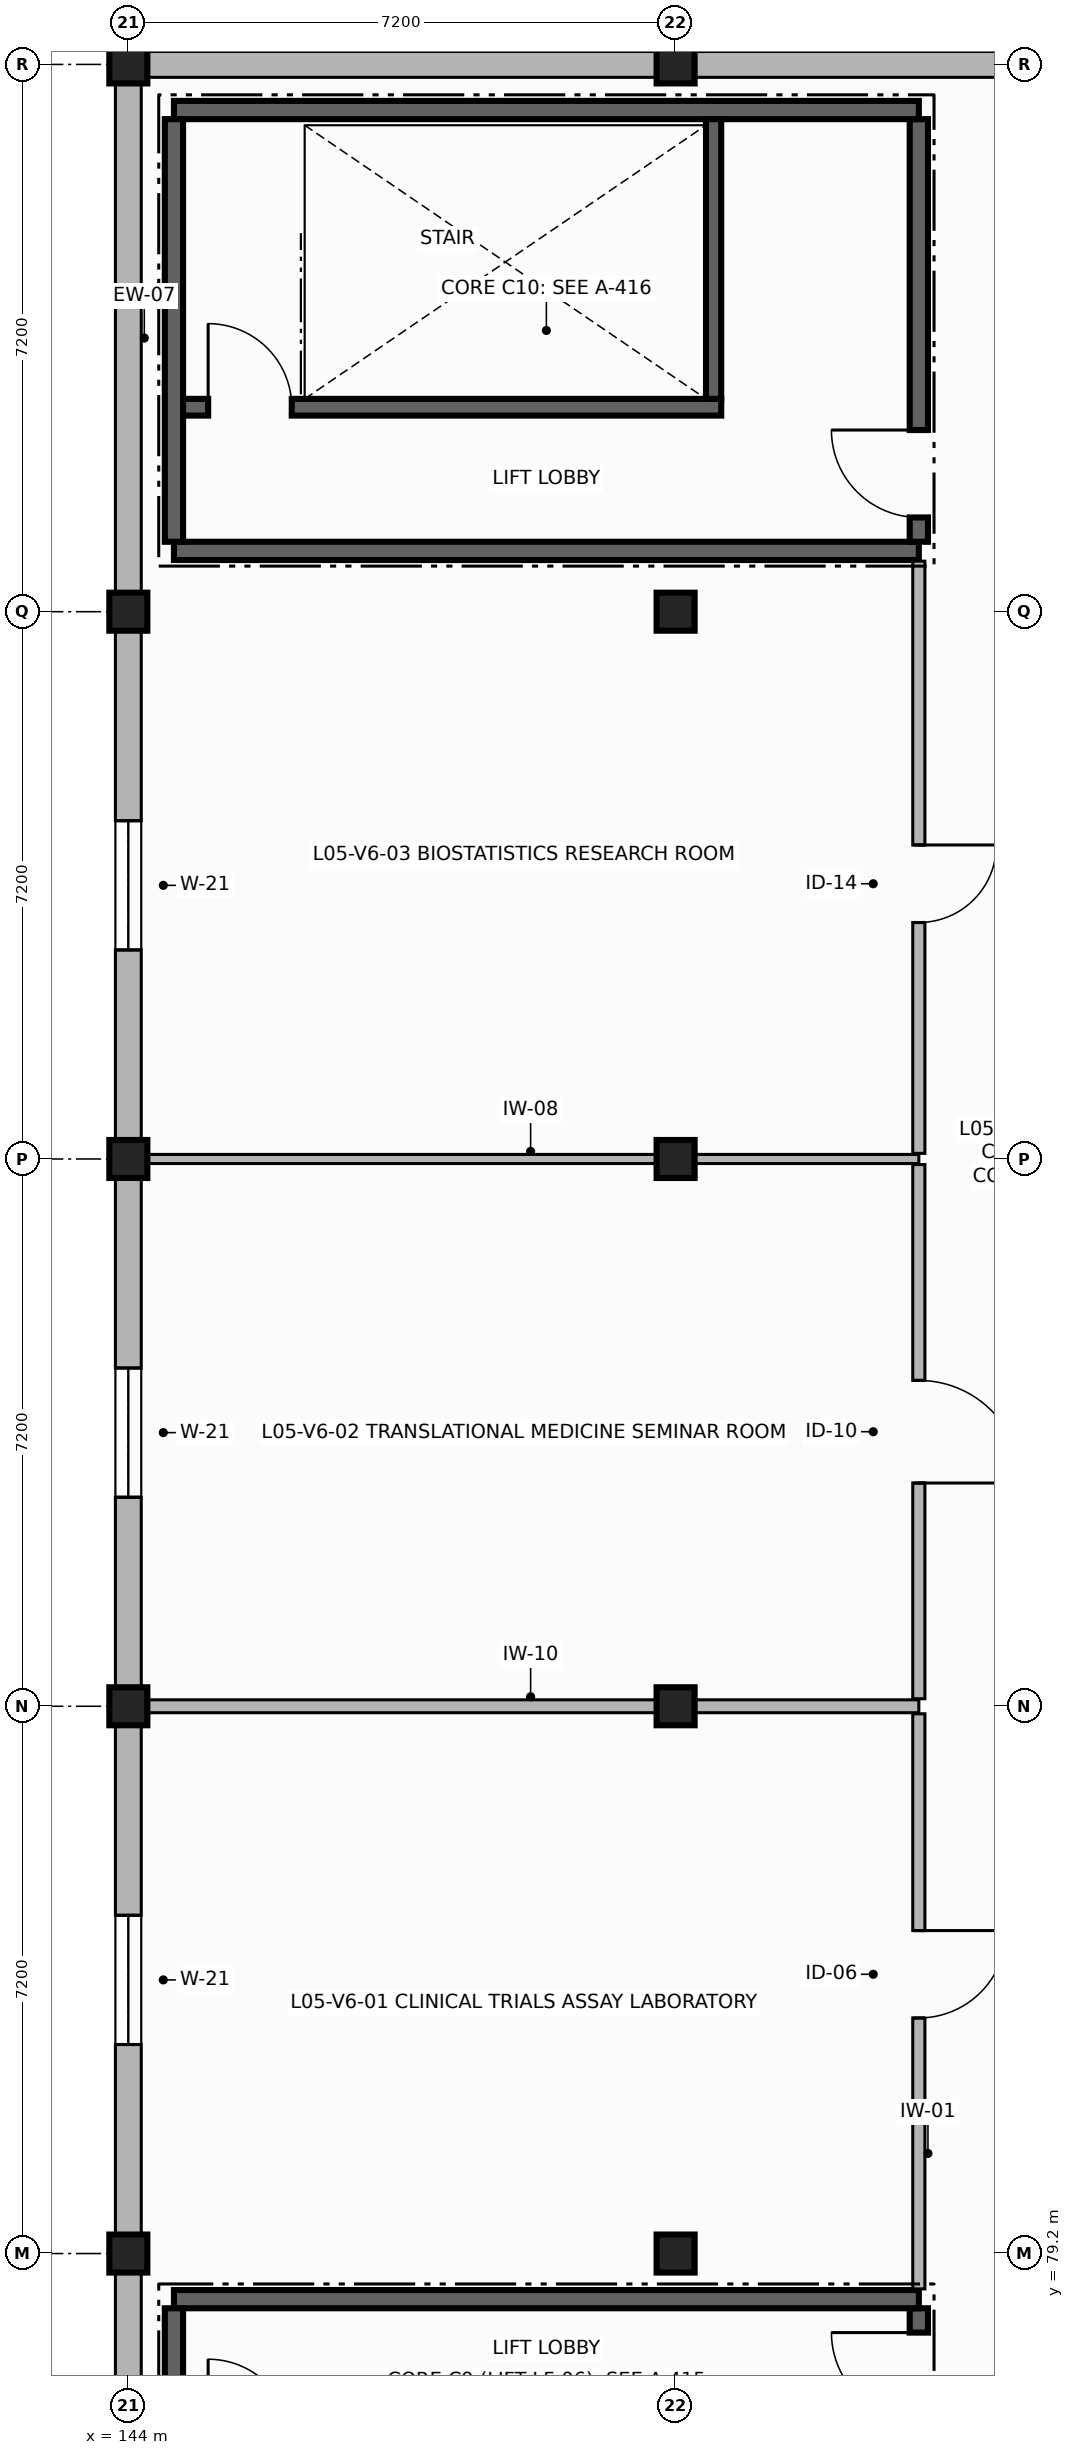
"""IFC4 building model, lengths in metres.
Left out: names, types, materials, properties, quantities, classifications, styles, units other than length and angle.
Written with IfcOpenShell. Run it as: python <this file> out.ifc"""

import sys

from ifc_helpers import new_model, si_unit, direction, frame, frame_2d, origin, origin_2d, place, context, subcontext, project, spatial, rectangle, extrude, element, fill, save


model = new_model("IFC4")
c1 = context("Model", 3, precision=1e-05, world=origin(), true_north=direction((0.0, 1.0)))
c2 = subcontext(c1, "Body", "Model", "MODEL_VIEW")
j1 = project(units=[si_unit("LENGTHUNIT", "METRE"), si_unit("PLANEANGLEUNIT", "RADIAN")], contexts=[c1])
p1 = place(None, origin())
s1 = spatial("IfcSite", under=j1, at=p1, CompositionType="ELEMENT")
p2 = place(p1, origin())
s2 = spatial("IfcBuilding", under=s1, at=p2, CompositionType="ELEMENT")
p3 = place(p2, frame((0.0, 0.0, 19.7)))
s3 = spatial("IfcBuildingStorey", under=s2, at=p3, CompositionType="ELEMENT", Elevation=19.7)
for number, where, z_axis, x_axis in (
    (1, (144.0, 79.2, 0.0), (0.0, 0.0, 1.0), (1.0, 0.0, 0.0)),
    (2, (144.0, 86.4, 0.0), (0.0, 0.0, 1.0), (1.0, 0.0, 0.0)),
    (3, (144.0, 93.6, 0.0), (0.0, 0.0, 1.0), (1.0, 0.0, 0.0)),
    (4, (144.0, 100.8, 0.0), (0.0, 0.0, 1.0), (1.0, 0.0, 0.0)),
    (5, (144.0, 108.0, 0.0), (0.0, 0.0, 1.0), (1.0, 0.0, 0.0)),
    (6, (151.2, 79.2, 0.0), (0.0, 0.0, 1.0), (1.0, 0.0, 0.0)),
    (7, (151.2, 86.4, 0.0), (0.0, 0.0, 1.0), (1.0, 0.0, 0.0)),
    (8, (151.2, 93.6, 0.0), (0.0, 0.0, 1.0), (1.0, 0.0, 0.0)),
    (9, (151.2, 100.8, 0.0), (0.0, 0.0, 1.0), (1.0, 0.0, 0.0)),
    (10, (151.2, 108.0, 0.0), (0.0, 0.0, 1.0), (1.0, 0.0, 0.0)),
):
    element("IfcColumn", number, at=place(p3, frame(where, z_axis=z_axis, x_axis=x_axis)), inside=s3, PredefinedType="COLUMN", context=c2, shape_type="SweptSolid", body=[
        extrude(rectangle(XDim=0.5, YDim=0.5, at=origin_2d()), origin(), (0.0, 0.0, 1.0), 3.46),
    ])
for number, where, z_axis, x_axis in (
    (11, (158.4, 108.0, 0.0), (0.0, 0.0, 1.0), (-1.0, 0.0, 0.0)),
    (12, (151.2, 108.0, 0.0), (0.0, 0.0, 1.0), (-1.0, 0.0, 0.0)),
    (13, (144.0, 108.0, 0.0), (0.0, 0.0, 1.0), (0.0, -1.0, 0.0)),
):
    element("IfcWall", number, at=place(p3, frame(where, z_axis=z_axis, x_axis=x_axis)), inside=s3, PredefinedType="SOLIDWALL", context=c2, shape_type="SweptSolid", body=[
        extrude(rectangle(XDim=7.2, YDim=0.34, at=frame_2d((3.6, 0.0))), origin(), (0.0, 0.0, 1.0), 2.79),
    ])
p4 = place(p3, frame((144.0, 100.8, 0.0), z_axis=(0.0, 0.0, 1.0), x_axis=(0.0, -1.0, 0.0)))
e14 = element("IfcWall", 14, at=p4, inside=s3, PredefinedType="SOLIDWALL", context=c2, shape_type="SweptSolid", body=[
    extrude(rectangle(XDim=7.2, YDim=0.34, at=frame_2d((3.6, 0.0))), origin(), (0.0, 0.0, 1.0), 2.79),
])
p5 = place(p4, frame((2.75, 0.0, 0.85)))
e15 = element("IfcOpeningElement", 15, at=p5, cuts=e14, PredefinedType="OPENING", context=c2, shape_type="SweptSolid", body=[
    extrude(rectangle(XDim=1.7, YDim=1.65, at=frame_2d((0.85, 0.825))), frame((0.0, 0.18, 0.0), z_axis=(0.0, -1.0, 0.0), x_axis=(1.0, 0.0, 0.0)), (0.0, 0.0, 1.0), 0.36),
])
p6 = place(p3, frame((144.0, 93.6, 0.0), z_axis=(0.0, 0.0, 1.0), x_axis=(0.0, -1.0, 0.0)))
e16 = element("IfcWall", 16, at=p6, inside=s3, PredefinedType="SOLIDWALL", context=c2, shape_type="SweptSolid", body=[
    extrude(rectangle(XDim=7.2, YDim=0.34, at=frame_2d((3.6, 0.0))), origin(), (0.0, 0.0, 1.0), 2.79),
])
p7 = place(p6, frame((2.75, 0.0, 0.85)))
e17 = element("IfcOpeningElement", 17, at=p7, cuts=e16, PredefinedType="OPENING", context=c2, shape_type="SweptSolid", body=[
    extrude(rectangle(XDim=1.7, YDim=1.65, at=frame_2d((0.85, 0.825))), frame((0.0, 0.18, 0.0), z_axis=(0.0, -1.0, 0.0), x_axis=(1.0, 0.0, 0.0)), (0.0, 0.0, 1.0), 0.36),
])
p8 = place(p3, frame((144.0, 86.4, 0.0), z_axis=(0.0, 0.0, 1.0), x_axis=(0.0, -1.0, 0.0)))
e18 = element("IfcWall", 18, at=p8, inside=s3, PredefinedType="SOLIDWALL", context=c2, shape_type="SweptSolid", body=[
    extrude(rectangle(XDim=7.2, YDim=0.34, at=frame_2d((3.6, 0.0))), origin(), (0.0, 0.0, 1.0), 2.79),
])
p9 = place(p8, frame((2.75, 0.0, 0.85)))
e19 = element("IfcOpeningElement", 19, at=p9, cuts=e18, PredefinedType="OPENING", context=c2, shape_type="SweptSolid", body=[
    extrude(rectangle(XDim=1.7, YDim=1.65, at=frame_2d((0.85, 0.825))), frame((0.0, 0.18, 0.0), z_axis=(0.0, -1.0, 0.0), x_axis=(1.0, 0.0, 0.0)), (0.0, 0.0, 1.0), 0.36),
])
p10 = place(p3, frame((144.0, 79.2, 0.0), z_axis=(0.0, 0.0, 1.0), x_axis=(0.0, -1.0, 0.0)))
e20 = element("IfcWall", 20, at=p10, inside=s3, PredefinedType="SOLIDWALL", context=c2, shape_type="SweptSolid", body=[
    extrude(rectangle(XDim=7.2, YDim=0.34, at=frame_2d((3.6, 0.0))), origin(), (0.0, 0.0, 1.0), 2.79),
])
p11 = place(p3, frame((154.4, 72.92, 0.0), z_axis=(0.0, 0.0, 1.0), x_axis=(0.0, 1.0, 0.0)))
e21 = element("IfcWall", 21, at=p11, inside=s3, PredefinedType="SHEAR", context=c2, shape_type="SweptSolid", body=[
    extrude(rectangle(XDim=5.56, YDim=0.24, at=frame_2d((2.78, 0.0))), origin(), (0.0, 0.0, 1.0), 3.46),
])
p12 = place(p11, frame((4.09, 0.0, 0.0)))
e22 = element("IfcOpeningElement", 22, at=p12, cuts=e21, PredefinedType="OPENING", context=c2, shape_type="SweptSolid", body=[
    extrude(rectangle(XDim=1.15, YDim=2.2, at=frame_2d((0.575, 1.1))), frame((0.0, 0.13, 0.0), z_axis=(0.0, -1.0, 0.0), x_axis=(1.0, 0.0, 0.0)), (0.0, 0.0, 1.0), 0.26),
])
p13 = place(p3, frame((154.4, 78.6, 0.0), z_axis=(0.0, 0.0, 1.0), x_axis=(-1.0, 0.0, 0.0)))
e23 = element("IfcWall", 23, at=p13, inside=s3, PredefinedType="SHEAR", context=c2, shape_type="SweptSolid", body=[
    extrude(rectangle(XDim=9.8, YDim=0.24, at=frame_2d((4.9, 0.0))), origin(), (0.0, 0.0, 1.0), 3.46),
])
p14 = place(p3, frame((144.6, 78.48, 0.0), z_axis=(0.0, 0.0, 1.0), x_axis=(0.0, -1.0, 0.0)))
e24 = element("IfcWall", 24, at=p14, inside=s3, PredefinedType="SHEAR", context=c2, shape_type="SweptSolid", body=[
    extrude(rectangle(XDim=5.56, YDim=0.24, at=frame_2d((2.78, 0.0))), origin(), (0.0, 0.0, 1.0), 3.46),
])
p15 = place(p3, frame((144.6, 101.6, 0.0), z_axis=(0.0, 0.0, 1.0), x_axis=(1.0, 0.0, 0.0)))
e25 = element("IfcWall", 25, at=p15, inside=s3, PredefinedType="SHEAR", context=c2, shape_type="SweptSolid", body=[
    extrude(rectangle(XDim=9.8, YDim=0.24, at=frame_2d((4.9, 0.0))), origin(), (0.0, 0.0, 1.0), 3.46),
])
p16 = place(p3, frame((154.4, 101.72, 0.0), z_axis=(0.0, 0.0, 1.0), x_axis=(0.0, 1.0, 0.0)))
e26 = element("IfcWall", 26, at=p16, inside=s3, PredefinedType="SHEAR", context=c2, shape_type="SweptSolid", body=[
    extrude(rectangle(XDim=5.56, YDim=0.24, at=frame_2d((2.78, 0.0))), origin(), (0.0, 0.0, 1.0), 3.46),
])
p17 = place(p16, frame((0.32, 0.0, 0.0)))
e27 = element("IfcOpeningElement", 27, at=p17, cuts=e26, PredefinedType="OPENING", context=c2, shape_type="SweptSolid", body=[
    extrude(rectangle(XDim=1.15, YDim=2.2, at=frame_2d((0.575, 1.1))), frame((0.0, 0.13, 0.0), z_axis=(0.0, -1.0, 0.0), x_axis=(1.0, 0.0, 0.0)), (0.0, 0.0, 1.0), 0.26),
])
p18 = place(p3, frame((154.4, 107.4, 0.0), z_axis=(0.0, 0.0, 1.0), x_axis=(-1.0, 0.0, 0.0)))
e28 = element("IfcWall", 28, at=p18, inside=s3, PredefinedType="SHEAR", context=c2, shape_type="SweptSolid", body=[
    extrude(rectangle(XDim=9.8, YDim=0.24, at=frame_2d((4.9, 0.0))), origin(), (0.0, 0.0, 1.0), 3.46),
])
p19 = place(p3, frame((144.6, 107.28, 0.0), z_axis=(0.0, 0.0, 1.0), x_axis=(0.0, -1.0, 0.0)))
e29 = element("IfcWall", 29, at=p19, inside=s3, PredefinedType="SHEAR", context=c2, shape_type="SweptSolid", body=[
    extrude(rectangle(XDim=5.56, YDim=0.24, at=frame_2d((2.78, 0.0))), origin(), (0.0, 0.0, 1.0), 3.46),
])
p20 = place(p3, frame((144.72, 103.49, 0.0), z_axis=(0.0, 0.0, 1.0), x_axis=(1.0, 0.0, 0.0)))
e30 = element("IfcWall", 30, at=p20, inside=s3, PredefinedType="SHEAR", context=c2, shape_type="SweptSolid", body=[
    extrude(rectangle(XDim=7.08, YDim=0.22, at=frame_2d((3.54, 0.0))), origin(), (0.0, 0.0, 1.0), 3.46),
])
p21 = place(p20, frame((0.33, 0.0, 0.0)))
e31 = element("IfcOpeningElement", 31, at=p21, cuts=e30, PredefinedType="OPENING", context=c2, shape_type="SweptSolid", body=[
    extrude(rectangle(XDim=1.1, YDim=2.15, at=frame_2d((0.55, 1.075))), frame((0.0, 0.12, 0.0), z_axis=(0.0, -1.0, 0.0), x_axis=(1.0, 0.0, 0.0)), (0.0, 0.0, 1.0), 0.24),
])
p22 = place(p3, frame((151.7, 103.6, 0.0), z_axis=(0.0, 0.0, 1.0), x_axis=(0.0, 1.0, 0.0)))
e32 = element("IfcWall", 32, at=p22, inside=s3, PredefinedType="SHEAR", context=c2, shape_type="SweptSolid", body=[
    extrude(rectangle(XDim=3.68, YDim=0.2, at=frame_2d((1.84, 0.0))), origin(), (0.0, 0.0, 1.0), 3.46),
])
p23 = place(p3, frame((144.185, 86.4, 0.0), z_axis=(0.0, 0.0, 1.0), x_axis=(1.0, 0.0, 0.0)))
e33 = element("IfcWall", 33, at=p23, inside=s3, PredefinedType="PARTITIONING", context=c2, shape_type="SweptSolid", body=[
    extrude(rectangle(XDim=10.215, YDim=0.17, at=frame_2d((5.107, 0.0))), origin(), (0.0, 0.0, 1.0), 2.78),
])
p24 = place(p3, frame((154.4, 86.301, 0.0), z_axis=(0.0, 0.0, 1.0), x_axis=(0.0, -1.0, 0.0)))
e34 = element("IfcWall", 34, at=p24, inside=s3, PredefinedType="PARTITIONING", context=c2, shape_type="SweptSolid", body=[
    extrude(rectangle(XDim=7.566, YDim=0.16, at=frame_2d((3.783, 0.0))), origin(), (0.0, 0.0, 1.0), 2.78),
])
p25 = place(p24, frame((2.852, 0.0, 0.0)))
e35 = element("IfcOpeningElement", 35, at=p25, cuts=e34, PredefinedType="OPENING", context=c2, shape_type="SweptSolid", body=[
    extrude(rectangle(XDim=1.15, YDim=2.25, at=frame_2d((0.575, 1.125))), frame((0.0, 0.09, 0.0), z_axis=(0.0, -1.0, 0.0), x_axis=(1.0, 0.0, 0.0)), (0.0, 0.0, 1.0), 0.18),
])
p26 = place(p3, frame((144.185, 93.6, 0.0), z_axis=(0.0, 0.0, 1.0), x_axis=(1.0, 0.0, 0.0)))
e36 = element("IfcWall", 36, at=p26, inside=s3, PredefinedType="PARTITIONING", context=c2, shape_type="SweptSolid", body=[
    extrude(rectangle(XDim=10.215, YDim=0.12, at=frame_2d((5.107, 0.0))), origin(), (0.0, 0.0, 1.0), 2.78),
])
p27 = place(p3, frame((154.4, 93.526, 0.0), z_axis=(0.0, 0.0, 1.0), x_axis=(0.0, -1.0, 0.0)))
e37 = element("IfcWall", 37, at=p27, inside=s3, PredefinedType="PARTITIONING", context=c2, shape_type="SweptSolid", body=[
    extrude(rectangle(XDim=7.027, YDim=0.16, at=frame_2d((3.513, 0.0))), origin(), (0.0, 0.0, 1.0), 2.78),
])
p28 = place(p27, frame((2.839, 0.0, 0.0)))
e38 = element("IfcOpeningElement", 38, at=p28, cuts=e37, PredefinedType="OPENING", context=c2, shape_type="SweptSolid", body=[
    extrude(rectangle(XDim=1.35, YDim=2.25, at=frame_2d((0.675, 1.125))), frame((0.0, 0.09, 0.0), z_axis=(0.0, -1.0, 0.0), x_axis=(1.0, 0.0, 0.0)), (0.0, 0.0, 1.0), 0.18),
])
p29 = place(p3, frame((154.4, 101.465, 0.0), z_axis=(0.0, 0.0, 1.0), x_axis=(0.0, -1.0, 0.0)))
e39 = element("IfcWall", 39, at=p29, inside=s3, PredefinedType="PARTITIONING", context=c2, shape_type="SweptSolid", body=[
    extrude(rectangle(XDim=7.791, YDim=0.16, at=frame_2d((3.896, 0.0))), origin(), (0.0, 0.0, 1.0), 2.78),
])
p30 = place(p29, frame((3.734, 0.0, 0.0)))
e40 = element("IfcOpeningElement", 40, at=p30, cuts=e39, PredefinedType="OPENING", context=c2, shape_type="SweptSolid", body=[
    extrude(rectangle(XDim=1.02, YDim=2.15, at=frame_2d((0.51, 1.075))), frame((0.0, 0.09, 0.0), z_axis=(0.0, -1.0, 0.0), x_axis=(1.0, 0.0, 0.0)), (0.0, 0.0, 1.0), 0.18),
])
p31 = place(p5, origin())
e41 = element("IfcWindow", 41, at=p31, inside=s3, PartitioningType="SINGLE_PANEL", PredefinedType="WINDOW", context=c2, shape_type="SweptSolid", body=[
    extrude(rectangle(XDim=1.7, YDim=1.65, at=frame_2d((0.85, 0.825))), frame((0.0, 0.03, 0.0), z_axis=(0.0, -1.0, 0.0), x_axis=(1.0, 0.0, 0.0)), (0.0, 0.0, 1.0), 0.06),
])
fill(e15, e41)
p32 = place(p7, origin())
e42 = element("IfcWindow", 42, at=p32, inside=s3, PartitioningType="SINGLE_PANEL", PredefinedType="WINDOW", context=c2, shape_type="SweptSolid", body=[
    extrude(rectangle(XDim=1.7, YDim=1.65, at=frame_2d((0.85, 0.825))), frame((0.0, 0.03, 0.0), z_axis=(0.0, -1.0, 0.0), x_axis=(1.0, 0.0, 0.0)), (0.0, 0.0, 1.0), 0.06),
])
fill(e17, e42)
p33 = place(p9, origin())
e43 = element("IfcWindow", 43, at=p33, inside=s3, PartitioningType="SINGLE_PANEL", PredefinedType="WINDOW", context=c2, shape_type="SweptSolid", body=[
    extrude(rectangle(XDim=1.7, YDim=1.65, at=frame_2d((0.85, 0.825))), frame((0.0, 0.03, 0.0), z_axis=(0.0, -1.0, 0.0), x_axis=(1.0, 0.0, 0.0)), (0.0, 0.0, 1.0), 0.06),
])
fill(e19, e43)
p34 = place(p12, origin())
e44 = element("IfcDoor", 44, at=p34, inside=s3, OperationType="SINGLE_SWING_RIGHT", PredefinedType="DOOR", context=c2, shape_type="SweptSolid", body=[
    extrude(rectangle(XDim=1.15, YDim=2.2, at=frame_2d((0.575, 1.1))), frame((0.0, 0.025, 0.0), z_axis=(0.0, -1.0, 0.0), x_axis=(1.0, 0.0, 0.0)), (0.0, 0.0, 1.0), 0.05),
])
fill(e22, e44)
p35 = place(p21, origin())
e45 = element("IfcDoor", 45, at=p35, inside=s3, OperationType="SINGLE_SWING_LEFT", PredefinedType="DOOR", context=c2, shape_type="SweptSolid", body=[
    extrude(rectangle(XDim=1.1, YDim=2.15, at=frame_2d((0.55, 1.075))), frame((0.0, 0.025, 0.0), z_axis=(0.0, -1.0, 0.0), x_axis=(1.0, 0.0, 0.0)), (0.0, 0.0, 1.0), 0.05),
])
fill(e31, e45)
p36 = place(p17, origin())
e46 = element("IfcDoor", 46, at=p36, inside=s3, OperationType="SINGLE_SWING_RIGHT", PredefinedType="DOOR", context=c2, shape_type="SweptSolid", body=[
    extrude(rectangle(XDim=1.15, YDim=2.2, at=frame_2d((0.575, 1.1))), frame((0.0, 0.025, 0.0), z_axis=(0.0, -1.0, 0.0), x_axis=(1.0, 0.0, 0.0)), (0.0, 0.0, 1.0), 0.05),
])
fill(e27, e46)
p37 = place(p25, origin())
e47 = element("IfcDoor", 47, at=p37, inside=s3, OperationType="SINGLE_SWING_LEFT", PredefinedType="DOOR", context=c2, shape_type="SweptSolid", body=[
    extrude(rectangle(XDim=1.15, YDim=2.25, at=frame_2d((0.575, 1.125))), frame((0.0, 0.025, 0.0), z_axis=(0.0, -1.0, 0.0), x_axis=(1.0, 0.0, 0.0)), (0.0, 0.0, 1.0), 0.05),
])
fill(e35, e47)
p38 = place(p28, origin())
e48 = element("IfcDoor", 48, at=p38, inside=s3, OperationType="SINGLE_SWING_RIGHT", PredefinedType="DOOR", context=c2, shape_type="SweptSolid", body=[
    extrude(rectangle(XDim=1.35, YDim=2.25, at=frame_2d((0.675, 1.125))), frame((0.0, 0.025, 0.0), z_axis=(0.0, -1.0, 0.0), x_axis=(1.0, 0.0, 0.0)), (0.0, 0.0, 1.0), 0.05),
])
fill(e38, e48)
p39 = place(p30, origin())
e49 = element("IfcDoor", 49, at=p39, inside=s3, OperationType="SINGLE_SWING_LEFT", PredefinedType="DOOR", context=c2, shape_type="SweptSolid", body=[
    extrude(rectangle(XDim=1.02, YDim=2.15, at=frame_2d((0.51, 1.075))), frame((0.0, 0.025, 0.0), z_axis=(0.0, -1.0, 0.0), x_axis=(1.0, 0.0, 0.0)), (0.0, 0.0, 1.0), 0.05),
])
fill(e40, e49)
save(model, sys.argv[1])
